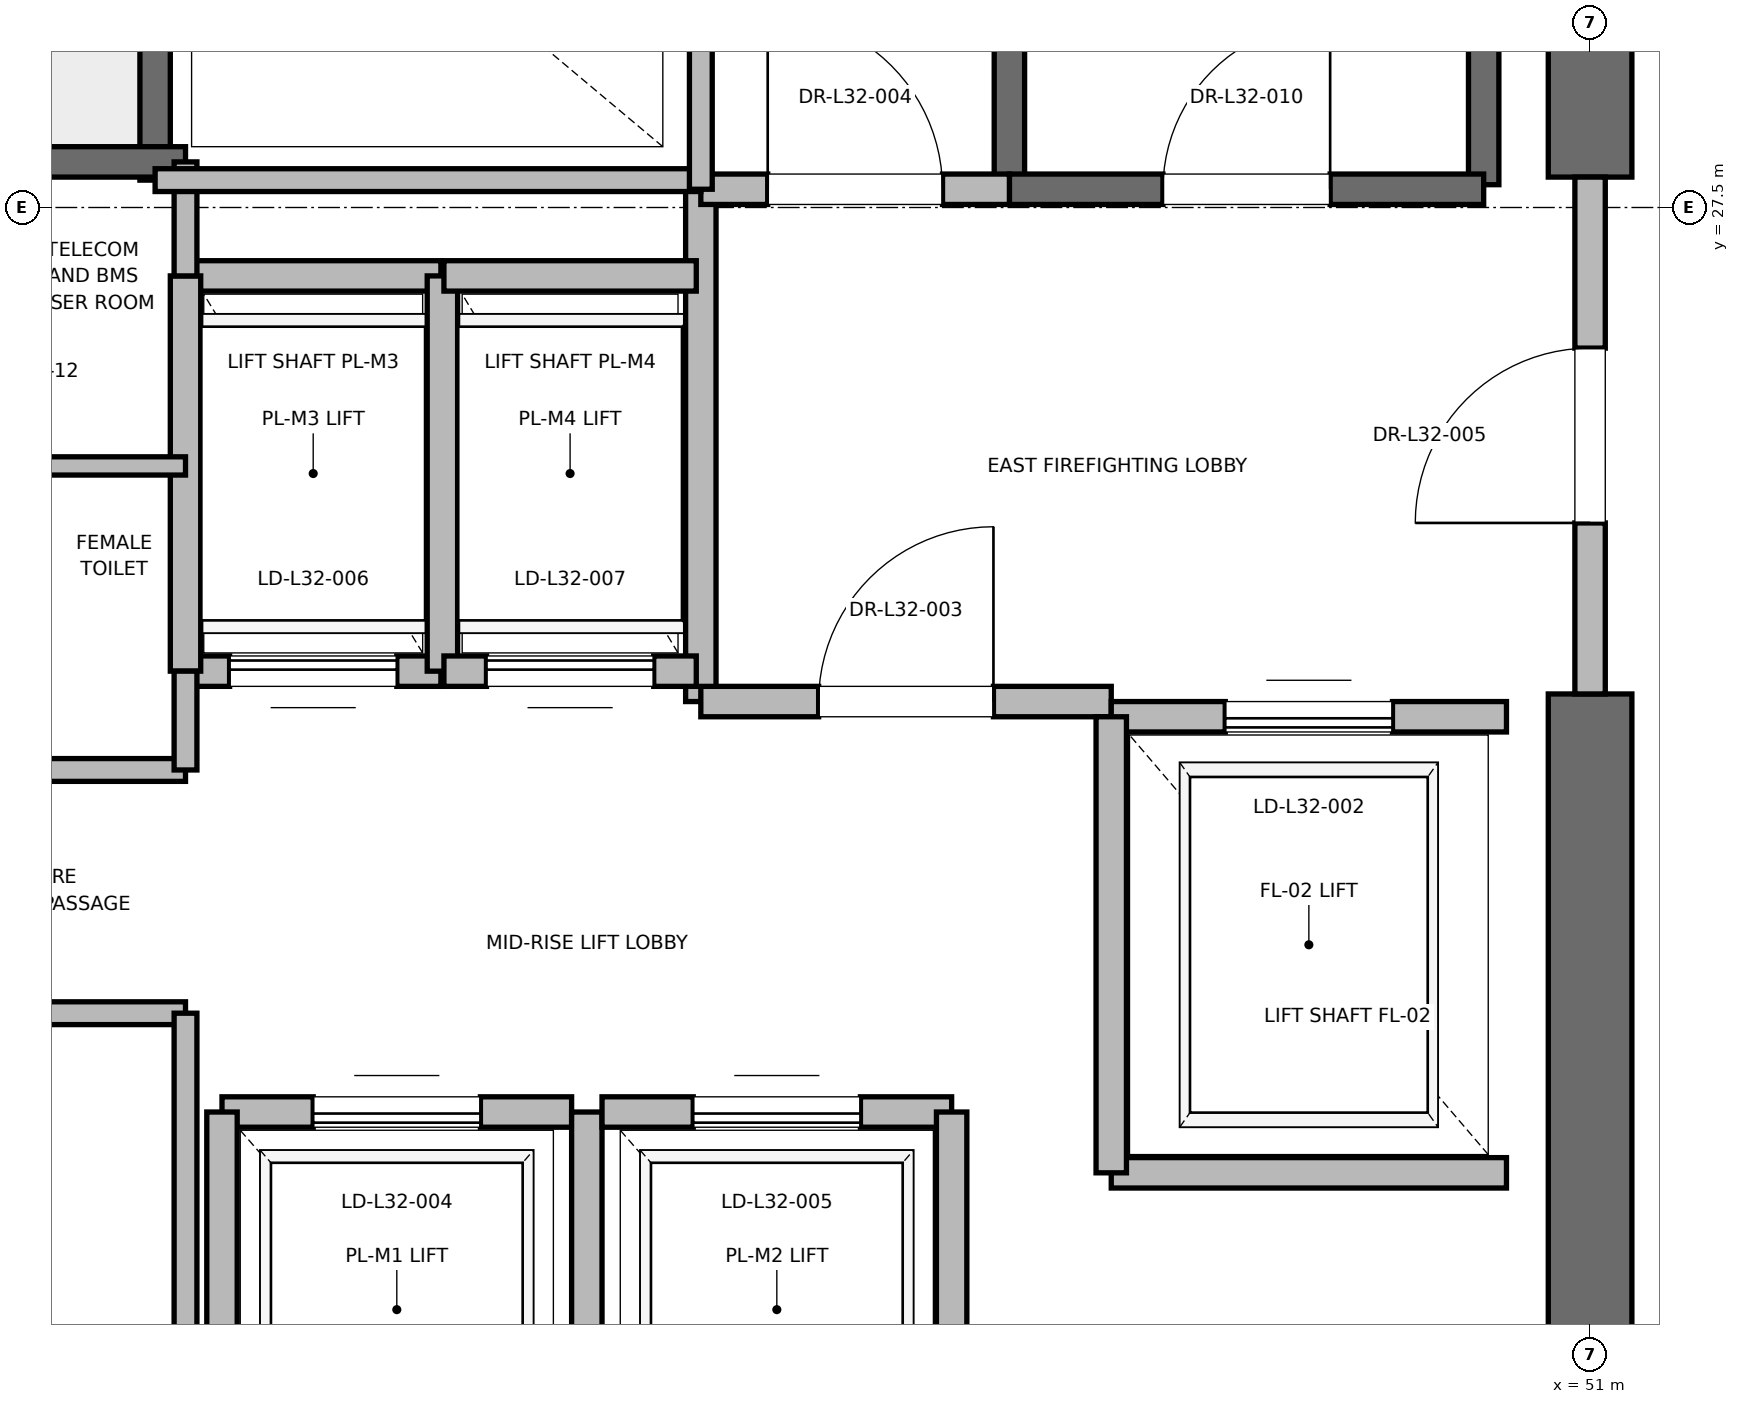
"""IFC4 building model, lengths in metres.
Left out: names, types, materials, properties, quantities, classifications, styles, units other than length and angle.
Written with IfcOpenShell. Run it as: python <this file> out.ifc"""

import sys

from ifc_helpers import new_model, si_unit, direction, frame, frame_2d, origin, place, context, subcontext, project, spatial, rectangle, extrude, element, fill, save


model = new_model("IFC4")
c1 = context("Model", 3, precision=1e-05, world=origin(), true_north=direction((0.0, 1.0)))
c2 = subcontext(c1, "Body", "Model", "MODEL_VIEW")
j1 = project(units=[si_unit("LENGTHUNIT", "METRE"), si_unit("PLANEANGLEUNIT", "RADIAN")], contexts=[c1])
p1 = place(None, origin())
s1 = spatial("IfcSite", under=j1, at=p1, CompositionType="ELEMENT")
p2 = place(p1, origin())
s2 = spatial("IfcBuilding", under=s1, at=p2, CompositionType="ELEMENT")
p3 = place(p2, frame((0.0, 0.0, 140.4)))
s3 = spatial("IfcBuildingStorey", under=s2, at=p3, CompositionType="ELEMENT", Elevation=140.4)
p4 = place(p3, frame((51.0, 18.5, 0.0), z_axis=(0.0, 0.0, 1.0), x_axis=(0.0, 1.0, 0.0)))
e1 = element("IfcWall", 1, at=p4, inside=s3, PredefinedType="SHEAR", context=c2, shape_type="SweptSolid", body=[
    extrude(rectangle(XDim=5.8, YDim=0.55, at=frame_2d((2.9, 0.0))), origin(), (0.0, 0.0, 1.0), 3.775),
])
p5 = place(p3, frame((51.0, 27.7, 0.0), z_axis=(0.0, 0.0, 1.0), x_axis=(0.0, 1.0, 0.0)))
e2 = element("IfcWall", 2, at=p5, inside=s3, PredefinedType="SHEAR", context=c2, shape_type="SweptSolid", body=[
    extrude(rectangle(XDim=8.8, YDim=0.55, at=frame_2d((4.4, 0.0))), origin(), (0.0, 0.0, 1.0), 3.775),
])
p6 = place(p3, frame((50.3, 27.65, 0.0), z_axis=(0.0, 0.0, 1.0), x_axis=(0.0, 1.0, 0.0)))
e3 = element("IfcWall", 3, at=p6, inside=s3, PredefinedType="SOLIDWALL", context=c2, shape_type="SweptSolid", body=[
    extrude(rectangle(XDim=8.15, YDim=0.2, at=frame_2d((4.075, 0.0))), origin(), (0.0, 0.0, 1.0), 3.775),
])
p7 = place(p3, frame((47.18, 27.62, 0.0), z_axis=(0.0, 0.0, 1.0), x_axis=(0.0, 1.0, 0.0)))
e4 = element("IfcWall", 4, at=p7, inside=s3, PredefinedType="SOLIDWALL", context=c2, shape_type="SweptSolid", body=[
    extrude(rectangle(XDim=8.18, YDim=0.2, at=frame_2d((4.09, 0.0))), origin(), (0.0, 0.0, 1.0), 3.775),
])
p8 = place(p3, frame((47.18, 27.62, 0.0), z_axis=(0.0, 0.0, 1.0), x_axis=(1.0, 0.0, 0.0)))
e5 = element("IfcWall", 5, at=p8, inside=s3, PredefinedType="SOLIDWALL", context=c2, shape_type="SweptSolid", body=[
    extrude(rectangle(XDim=3.12, YDim=0.2, at=frame_2d((1.56, 0.0))), origin(), (0.0, 0.0, 1.0), 3.775),
])
p9 = place(p8, frame((1.01, 0.0, 0.0)))
e6 = element("IfcOpeningElement", 6, at=p9, cuts=e5, PredefinedType="OPENING", context=c2, shape_type="SweptSolid", body=[
    extrude(rectangle(XDim=1.1, YDim=2.15, at=frame_2d((0.55, 1.075))), frame((0.0, 0.1, 0.0), z_axis=(0.0, -1.0, 0.0), x_axis=(1.0, 0.0, 0.0)), (0.0, 0.0, 1.0), 0.2),
])
p10 = place(p3, frame((41.56, 27.68, 0.0), z_axis=(0.0, 0.0, 1.0), x_axis=(0.0, 1.0, 0.0)))
e7 = element("IfcWall", 7, at=p10, inside=s3, PredefinedType="SOLIDWALL", context=c2, shape_type="SweptSolid", body=[
    extrude(rectangle(XDim=8.57, YDim=0.2, at=frame_2d((4.285, 0.0))), origin(), (0.0, 0.0, 1.0), 3.775),
])
p11 = place(p3, frame((38.44, 27.8, 0.0), z_axis=(0.0, 0.0, 1.0), x_axis=(1.0, 0.0, 0.0)))
e8 = element("IfcWall", 8, at=p11, inside=s3, PredefinedType="SOLIDWALL", context=c2, shape_type="SweptSolid", body=[
    extrude(rectangle(XDim=3.32, YDim=0.2, at=frame_2d((1.66, 0.0))), origin(), (0.0, 0.0, 1.0), 3.775),
])
p12 = place(p3, frame((45.15, 24.25, 0.0), z_axis=(0.0, 0.0, 1.0), x_axis=(0.0, 1.0, 0.0)))
e9 = element("IfcWall", 9, at=p12, inside=s3, PredefinedType="PARTITIONING", context=c2, shape_type="SweptSolid", body=[
    extrude(rectangle(XDim=3.37, YDim=0.2, at=frame_2d((1.685, 0.0))), origin(), (0.0, 0.0, 1.0), 3.775),
])
p13 = place(p3, frame((45.15, 24.25, 0.0), z_axis=(0.0, 0.0, 1.0), x_axis=(1.0, 0.0, 0.0)))
e10 = element("IfcWall", 10, at=p13, inside=s3, PredefinedType="PARTITIONING", context=c2, shape_type="SweptSolid", body=[
    extrude(rectangle(XDim=2.7, YDim=0.2, at=frame_2d((1.35, 0.0))), origin(), (0.0, 0.0, 1.0), 3.775),
])
p14 = place(p13, frame((0.775, 0.0, 0.0)))
e11 = element("IfcOpeningElement", 11, at=p14, cuts=e10, PredefinedType="OPENING", context=c2, shape_type="SweptSolid", body=[
    extrude(rectangle(XDim=1.15, YDim=2.2, at=frame_2d((0.575, 1.1))), frame((0.0, 0.1, 0.0), z_axis=(0.0, -1.0, 0.0), x_axis=(1.0, 0.0, 0.0)), (0.0, 0.0, 1.0), 0.2),
])
p15 = place(p3, frame((45.15, 27.62, 0.0), z_axis=(0.0, 0.0, 1.0), x_axis=(1.0, 0.0, 0.0)))
e12 = element("IfcWall", 12, at=p15, inside=s3, PredefinedType="PARTITIONING", context=c2, shape_type="SweptSolid", body=[
    extrude(rectangle(XDim=2.03, YDim=0.2, at=frame_2d((1.015, 0.0))), origin(), (0.0, 0.0, 1.0), 3.775),
])
p16 = place(p15, frame((0.44, 0.0, 0.0)))
e13 = element("IfcOpeningElement", 13, at=p16, cuts=e12, PredefinedType="OPENING", context=c2, shape_type="SweptSolid", body=[
    extrude(rectangle(XDim=1.15, YDim=2.2, at=frame_2d((0.575, 1.1))), frame((0.0, 0.1, 0.0), z_axis=(0.0, -1.0, 0.0), x_axis=(1.0, 0.0, 0.0)), (0.0, 0.0, 1.0), 0.2),
])
p17 = place(p3, frame((51.0, 24.3, 0.0), z_axis=(0.0, 0.0, 1.0), x_axis=(0.0, 1.0, 0.0)))
e14 = element("IfcWall", 14, at=p17, inside=s3, PredefinedType="PARTITIONING", context=c2, shape_type="SweptSolid", body=[
    extrude(rectangle(XDim=3.4, YDim=0.2, at=frame_2d((1.7, 0.0))), origin(), (0.0, 0.0, 1.0), 2.755),
])
p18 = place(p17, frame((1.125, 0.0, 0.0)))
e15 = element("IfcOpeningElement", 15, at=p18, cuts=e14, PredefinedType="OPENING", context=c2, shape_type="SweptSolid", body=[
    extrude(rectangle(XDim=1.15, YDim=2.2, at=frame_2d((0.575, 1.1))), frame((0.0, 0.1, 0.0), z_axis=(0.0, -1.0, 0.0), x_axis=(1.0, 0.0, 0.0)), (0.0, 0.0, 1.0), 0.2),
])
p19 = place(p3, frame((47.85, 21.15, 0.0), z_axis=(0.0, 0.0, 1.0), x_axis=(1.0, 0.0, 0.0)))
e16 = element("IfcWall", 16, at=p19, inside=s3, PredefinedType="SOLIDWALL", context=c2, shape_type="SweptSolid", body=[
    extrude(rectangle(XDim=2.6, YDim=0.2, at=frame_2d((1.3, 0.0))), origin(), (0.0, 0.0, 1.0), 3.775),
])
p20 = place(p3, frame((50.45, 24.15, 0.0), z_axis=(0.0, 0.0, 1.0), x_axis=(-1.0, 0.0, 0.0)))
e17 = element("IfcWall", 17, at=p20, inside=s3, PredefinedType="SOLIDWALL", context=c2, shape_type="SweptSolid", body=[
    extrude(rectangle(XDim=2.6, YDim=0.2, at=frame_2d((1.3, 0.0))), origin(), (0.0, 0.0, 1.0), 2.755),
])
p21 = place(p20, frame((0.75, 0.0, 0.0)))
e18 = element("IfcOpeningElement", 18, at=p21, cuts=e17, PredefinedType="OPENING", context=c2, shape_type="SweptSolid", body=[
    extrude(rectangle(XDim=1.1, YDim=2.2, at=frame_2d((0.55, 1.1))), frame((0.0, 0.1, 0.0), z_axis=(0.0, -1.0, 0.0), x_axis=(1.0, 0.0, 0.0)), (0.0, 0.0, 1.0), 0.2),
])
p22 = place(p3, frame((47.85, 24.15, 0.0), z_axis=(0.0, 0.0, 1.0), x_axis=(0.0, -1.0, 0.0)))
e19 = element("IfcWall", 19, at=p22, inside=s3, PredefinedType="SOLIDWALL", context=c2, shape_type="SweptSolid", body=[
    extrude(rectangle(XDim=3.0, YDim=0.2, at=frame_2d((1.5, 0.0))), origin(), (0.0, 0.0, 1.0), 3.775),
])
p23 = place(p3, frame((44.3, 21.55, 0.0), z_axis=(0.0, 0.0, 1.0), x_axis=(-1.0, 0.0, 0.0)))
e20 = element("IfcWall", 20, at=p23, inside=s3, PredefinedType="SOLIDWALL", context=c2, shape_type="SweptSolid", body=[
    extrude(rectangle(XDim=2.3, YDim=0.2, at=frame_2d((1.15, 0.0))), origin(), (0.0, 0.0, 1.0), 3.775),
])
p24 = place(p23, frame((0.6, 0.0, 0.0)))
e21 = element("IfcOpeningElement", 21, at=p24, cuts=e20, PredefinedType="OPENING", context=c2, shape_type="SweptSolid", body=[
    extrude(rectangle(XDim=1.1, YDim=2.2, at=frame_2d((0.55, 1.1))), frame((0.0, 0.1, 0.0), z_axis=(0.0, -1.0, 0.0), x_axis=(1.0, 0.0, 0.0)), (0.0, 0.0, 1.0), 0.2),
])
p25 = place(p3, frame((42.0, 21.55, 0.0), z_axis=(0.0, 0.0, 1.0), x_axis=(0.0, -1.0, 0.0)))
e22 = element("IfcWall", 22, at=p25, inside=s3, PredefinedType="SOLIDWALL", context=c2, shape_type="SweptSolid", body=[
    extrude(rectangle(XDim=2.6, YDim=0.2, at=frame_2d((1.3, 0.0))), origin(), (0.0, 0.0, 1.0), 2.755),
])
p26 = place(p3, frame((44.4, 18.95, 0.0), z_axis=(0.0, 0.0, 1.0), x_axis=(0.0, 1.0, 0.0)))
e23 = element("IfcWall", 23, at=p26, inside=s3, PredefinedType="SOLIDWALL", context=c2, shape_type="SweptSolid", body=[
    extrude(rectangle(XDim=2.6, YDim=0.2, at=frame_2d((1.3, 0.0))), origin(), (0.0, 0.0, 1.0), 3.775),
])
p27 = place(p3, frame((46.8, 21.55, 0.0), z_axis=(0.0, 0.0, 1.0), x_axis=(-1.0, 0.0, 0.0)))
e24 = element("IfcWall", 24, at=p27, inside=s3, PredefinedType="SOLIDWALL", context=c2, shape_type="SweptSolid", body=[
    extrude(rectangle(XDim=2.3, YDim=0.2, at=frame_2d((1.15, 0.0))), origin(), (0.0, 0.0, 1.0), 3.775),
])
p28 = place(p27, frame((0.6, 0.0, 0.0)))
e25 = element("IfcOpeningElement", 25, at=p28, cuts=e24, PredefinedType="OPENING", context=c2, shape_type="SweptSolid", body=[
    extrude(rectangle(XDim=1.1, YDim=2.2, at=frame_2d((0.55, 1.1))), frame((0.0, 0.1, 0.0), z_axis=(0.0, -1.0, 0.0), x_axis=(1.0, 0.0, 0.0)), (0.0, 0.0, 1.0), 0.2),
])
p29 = place(p3, frame((46.8, 18.95, 0.0), z_axis=(0.0, 0.0, 1.0), x_axis=(0.0, 1.0, 0.0)))
e26 = element("IfcWall", 26, at=p29, inside=s3, PredefinedType="SOLIDWALL", context=c2, shape_type="SweptSolid", body=[
    extrude(rectangle(XDim=2.6, YDim=0.2, at=frame_2d((1.3, 0.0))), origin(), (0.0, 0.0, 1.0), 3.775),
])
p30 = place(p3, frame((41.76, 24.45, 0.0), z_axis=(0.0, 0.0, 1.0), x_axis=(1.0, 0.0, 0.0)))
e27 = element("IfcWall", 27, at=p30, inside=s3, PredefinedType="SOLIDWALL", context=c2, shape_type="SweptSolid", body=[
    extrude(rectangle(XDim=1.68, YDim=0.2, at=frame_2d((0.84, 0.0))), origin(), (0.0, 0.0, 1.0), 3.775),
])
p31 = place(p30, frame((0.29, 0.0, 0.0)))
e28 = element("IfcOpeningElement", 28, at=p31, cuts=e27, PredefinedType="OPENING", context=c2, shape_type="SweptSolid", body=[
    extrude(rectangle(XDim=1.1, YDim=2.2, at=frame_2d((0.55, 1.1))), frame((0.0, 0.1, 0.0), z_axis=(0.0, -1.0, 0.0), x_axis=(1.0, 0.0, 0.0)), (0.0, 0.0, 1.0), 0.2),
])
p32 = place(p3, frame((43.44, 27.05, 0.0), z_axis=(0.0, 0.0, 1.0), x_axis=(-1.0, 0.0, 0.0)))
e29 = element("IfcWall", 29, at=p32, inside=s3, PredefinedType="SOLIDWALL", context=c2, shape_type="SweptSolid", body=[
    extrude(rectangle(XDim=1.68, YDim=0.2, at=frame_2d((0.84, 0.0))), origin(), (0.0, 0.0, 1.0), 3.775),
])
for number, where, z_axis, x_axis in (
    (30, (41.76, 27.05, 0.0), (0.0, 0.0, 1.0), (0.0, -1.0, 0.0)),
    (31, (43.45, 24.45, 0.0), (0.0, 0.0, 1.0), (0.0, 1.0, 0.0)),
):
    element("IfcWall", number, at=place(p3, frame(where, z_axis=z_axis, x_axis=x_axis)), inside=s3, PredefinedType="SOLIDWALL", context=c2, shape_type="SweptSolid", body=[
        extrude(rectangle(XDim=2.6, YDim=0.2, at=frame_2d((1.3, 0.0))), origin(), (0.0, 0.0, 1.0), 3.775),
    ])
p33 = place(p3, frame((43.46, 24.45, 0.0), z_axis=(0.0, 0.0, 1.0), x_axis=(1.0, 0.0, 0.0)))
e32 = element("IfcWall", 32, at=p33, inside=s3, PredefinedType="SOLIDWALL", context=c2, shape_type="SweptSolid", body=[
    extrude(rectangle(XDim=1.66, YDim=0.2, at=frame_2d((0.83, 0.0))), origin(), (0.0, 0.0, 1.0), 3.775),
])
p34 = place(p33, frame((0.28, 0.0, 0.0)))
e33 = element("IfcOpeningElement", 33, at=p34, cuts=e32, PredefinedType="OPENING", context=c2, shape_type="SweptSolid", body=[
    extrude(rectangle(XDim=1.1, YDim=2.2, at=frame_2d((0.55, 1.1))), frame((0.0, 0.1, 0.0), z_axis=(0.0, -1.0, 0.0), x_axis=(1.0, 0.0, 0.0)), (0.0, 0.0, 1.0), 0.2),
])
p35 = place(p3, frame((45.12, 27.05, 0.0), z_axis=(0.0, 0.0, 1.0), x_axis=(-1.0, 0.0, 0.0)))
e34 = element("IfcWall", 34, at=p35, inside=s3, PredefinedType="SOLIDWALL", context=c2, shape_type="SweptSolid", body=[
    extrude(rectangle(XDim=1.66, YDim=0.2, at=frame_2d((0.83, 0.0))), origin(), (0.0, 0.0, 1.0), 3.775),
])
for number, where, z_axis, x_axis in (
    (35, (39.95, 22.2, 0.0), (0.0, 0.0, 1.0), (1.0, 0.0, 0.0)),
    (36, (39.95, 23.8, 0.0), (0.0, 0.0, 1.0), (1.0, 0.0, 0.0)),
):
    element("IfcWall", number, at=place(p3, frame(where, z_axis=z_axis, x_axis=x_axis)), inside=s3, PredefinedType="PARTITIONING", context=c2, shape_type="SweptSolid", body=[
        extrude(rectangle(XDim=1.81, YDim=0.15, at=frame_2d((0.905, 0.0))), origin(), (0.0, 0.0, 1.0), 2.85),
    ])
p36 = place(p3, frame((39.95, 25.8, 0.0), z_axis=(0.0, 0.0, 1.0), x_axis=(1.0, 0.0, 0.0)))
e37 = element("IfcWall", 37, at=p36, inside=s3, PredefinedType="PARTITIONING", context=c2, shape_type="SweptSolid", body=[
    extrude(rectangle(XDim=1.81, YDim=0.12, at=frame_2d((0.905, 0.0))), origin(), (0.0, 0.0, 1.0), 2.85),
])
p37 = place(p3, frame((41.76, 18.6, 0.0), z_axis=(0.0, 0.0, 1.0), x_axis=(0.0, 1.0, 0.0)))
e38 = element("IfcWall", 38, at=p37, inside=s3, PredefinedType="PARTITIONING", context=c2, shape_type="SweptSolid", body=[
    extrude(rectangle(XDim=3.6, YDim=0.15, at=frame_2d((1.8, 0.0))), origin(), (0.0, 0.0, 1.0), 2.755),
])
p38 = place(p3, frame((41.76, 23.8, 0.0), z_axis=(0.0, 0.0, 1.0), x_axis=(0.0, 1.0, 0.0)))
e39 = element("IfcWall", 39, at=p38, inside=s3, PredefinedType="PARTITIONING", context=c2, shape_type="SweptSolid", body=[
    extrude(rectangle(XDim=0.65, YDim=0.15, at=frame_2d((0.325, 0.0))), origin(), (0.0, 0.0, 1.0), 2.85),
])
p39 = place(p3, frame((41.76, 27.05, 0.0), z_axis=(0.0, 0.0, 1.0), x_axis=(0.0, 1.0, 0.0)))
e40 = element("IfcWall", 40, at=p39, inside=s3, PredefinedType="PARTITIONING", context=c2, shape_type="SweptSolid", body=[
    extrude(rectangle(XDim=0.75, YDim=0.15, at=frame_2d((0.375, 0.0))), origin(), (0.0, 0.0, 1.0), 2.85),
])
p40 = place(p3, frame((41.56, 27.68, 0.0), z_axis=(0.0, 0.0, 1.0), x_axis=(1.0, 0.0, 0.0)))
e41 = element("IfcWall", 41, at=p40, inside=s3, PredefinedType="PARTITIONING", context=c2, shape_type="SweptSolid", body=[
    extrude(rectangle(XDim=3.59, YDim=0.15, at=frame_2d((1.795, 0.0))), origin(), (0.0, 0.0, 1.0), 2.85),
])
p41 = place(p3, frame((45.15, 27.62, 0.0), z_axis=(0.0, 0.0, 1.0), x_axis=(0.0, 1.0, 0.0)))
e42 = element("IfcWall", 42, at=p41, inside=s3, PredefinedType="PARTITIONING", context=c2, shape_type="SweptSolid", body=[
    extrude(rectangle(XDim=3.1, YDim=0.15, at=frame_2d((1.55, 0.0))), origin(), (0.0, 0.0, 1.0), 2.85),
])
p42 = place(p9, origin())
e43 = element("IfcDoor", 43, at=p42, inside=s3, OperationType="SINGLE_SWING_RIGHT", PredefinedType="DOOR", context=c2, shape_type="SweptSolid", body=[
    extrude(rectangle(XDim=1.1, YDim=2.15, at=frame_2d((0.55, 1.075))), frame((0.0, 0.025, 0.0), z_axis=(0.0, -1.0, 0.0), x_axis=(1.0, 0.0, 0.0)), (0.0, 0.0, 1.0), 0.05),
])
fill(e6, e43)
p43 = place(p14, origin())
e44 = element("IfcDoor", 44, at=p43, inside=s3, OperationType="SINGLE_SWING_RIGHT", PredefinedType="DOOR", context=c2, shape_type="SweptSolid", body=[
    extrude(rectangle(XDim=1.15, YDim=2.2, at=frame_2d((0.575, 1.1))), frame((0.0, 0.025, 0.0), z_axis=(0.0, -1.0, 0.0), x_axis=(1.0, 0.0, 0.0)), (0.0, 0.0, 1.0), 0.05),
])
fill(e11, e44)
p44 = place(p16, origin())
e45 = element("IfcDoor", 45, at=p44, inside=s3, OperationType="SINGLE_SWING_LEFT", PredefinedType="DOOR", context=c2, shape_type="SweptSolid", body=[
    extrude(rectangle(XDim=1.15, YDim=2.2, at=frame_2d((0.575, 1.1))), frame((0.0, 0.025, 0.0), z_axis=(0.0, -1.0, 0.0), x_axis=(1.0, 0.0, 0.0)), (0.0, 0.0, 1.0), 0.05),
])
fill(e13, e45)
p45 = place(p18, origin())
e46 = element("IfcDoor", 46, at=p45, inside=s3, OperationType="SINGLE_SWING_LEFT", PredefinedType="DOOR", context=c2, shape_type="SweptSolid", body=[
    extrude(rectangle(XDim=1.15, YDim=2.2, at=frame_2d((0.575, 1.1))), frame((0.0, 0.025, 0.0), z_axis=(0.0, -1.0, 0.0), x_axis=(1.0, 0.0, 0.0)), (0.0, 0.0, 1.0), 0.05),
])
fill(e15, e46)
p46 = place(p21, origin())
e47 = element("IfcDoor", 47, at=p46, inside=s3, OperationType="SLIDING_TO_RIGHT", PredefinedType="DOOR", context=c2, shape_type="SweptSolid", body=[
    extrude(rectangle(XDim=1.1, YDim=2.2, at=frame_2d((0.55, 1.1))), frame((0.0, 0.025, 0.0), z_axis=(0.0, -1.0, 0.0), x_axis=(1.0, 0.0, 0.0)), (0.0, 0.0, 1.0), 0.05),
])
fill(e18, e47)
p47 = place(p24, origin())
e48 = element("IfcDoor", 48, at=p47, inside=s3, OperationType="SLIDING_TO_RIGHT", PredefinedType="DOOR", context=c2, shape_type="SweptSolid", body=[
    extrude(rectangle(XDim=1.1, YDim=2.2, at=frame_2d((0.55, 1.1))), frame((0.0, 0.025, 0.0), z_axis=(0.0, -1.0, 0.0), x_axis=(1.0, 0.0, 0.0)), (0.0, 0.0, 1.0), 0.05),
])
fill(e21, e48)
p48 = place(p28, origin())
e49 = element("IfcDoor", 49, at=p48, inside=s3, OperationType="SLIDING_TO_RIGHT", PredefinedType="DOOR", context=c2, shape_type="SweptSolid", body=[
    extrude(rectangle(XDim=1.1, YDim=2.2, at=frame_2d((0.55, 1.1))), frame((0.0, 0.025, 0.0), z_axis=(0.0, -1.0, 0.0), x_axis=(1.0, 0.0, 0.0)), (0.0, 0.0, 1.0), 0.05),
])
fill(e25, e49)
p49 = place(p31, origin())
e50 = element("IfcDoor", 50, at=p49, inside=s3, OperationType="SLIDING_TO_RIGHT", PredefinedType="DOOR", context=c2, shape_type="SweptSolid", body=[
    extrude(rectangle(XDim=1.1, YDim=2.2, at=frame_2d((0.55, 1.1))), frame((0.0, 0.025, 0.0), z_axis=(0.0, -1.0, 0.0), x_axis=(1.0, 0.0, 0.0)), (0.0, 0.0, 1.0), 0.05),
])
fill(e28, e50)
p50 = place(p34, origin())
e51 = element("IfcDoor", 51, at=p50, inside=s3, OperationType="SLIDING_TO_RIGHT", PredefinedType="DOOR", context=c2, shape_type="SweptSolid", body=[
    extrude(rectangle(XDim=1.1, YDim=2.2, at=frame_2d((0.55, 1.1))), frame((0.0, 0.025, 0.0), z_axis=(0.0, -1.0, 0.0), x_axis=(1.0, 0.0, 0.0)), (0.0, 0.0, 1.0), 0.05),
])
fill(e33, e51)
save(model, sys.argv[1])
